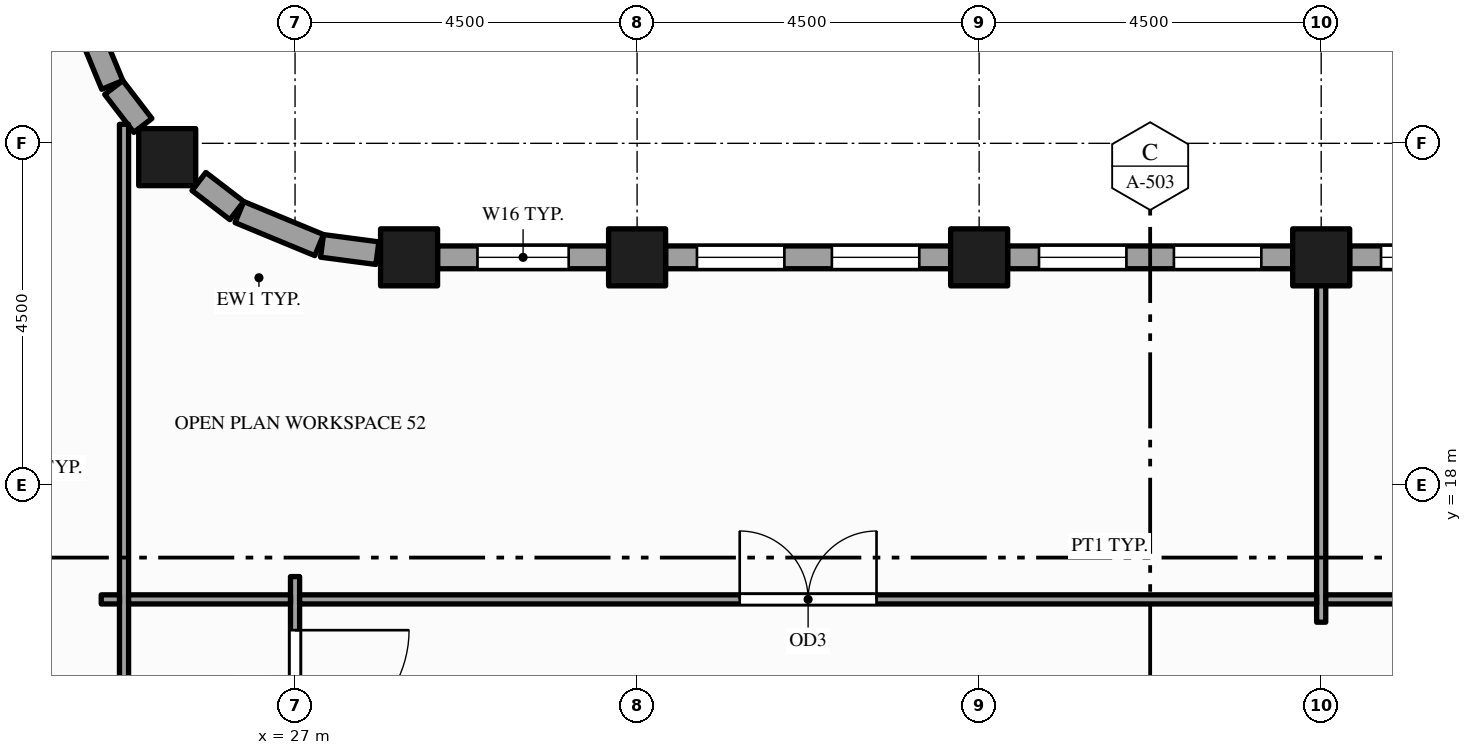
"""IFC4 building model, lengths in metres.
Left out: names, types, materials, properties, quantities, classifications, styles, units other than length and angle.
Written with IfcOpenShell. Run it as: python <this file> out.ifc"""

import sys

from ifc_helpers import new_model, si_unit, direction, frame, frame_2d, origin, origin_2d, place, context, subcontext, project, spatial, rectangle, hollow_rectangle, extrude, element, fill, save


model = new_model("IFC4")
c1 = context("Model", 3, precision=1e-05, world=origin(), true_north=direction((0.0, 1.0)))
c2 = subcontext(c1, "Body", "Model", "MODEL_VIEW")
j1 = project(units=[si_unit("LENGTHUNIT", "METRE"), si_unit("PLANEANGLEUNIT", "RADIAN")], contexts=[c1])
p1 = place(None, origin())
s1 = spatial("IfcSite", under=j1, at=p1, CompositionType="ELEMENT")
p2 = place(p1, origin())
s2 = spatial("IfcBuilding", under=s1, at=p2, CompositionType="ELEMENT")
p3 = place(p2, frame((0.0, 0.0, 215.0)))
s3 = spatial("IfcBuildingStorey", under=s2, at=p3, CompositionType="ELEMENT", Elevation=215.0)
for number, where, z_axis, x_axis in (
    (1, (25.318, 22.318, -0.15), (0.0, 0.0, 1.0), (1.0, 0.0, 0.0)),
    (2, (28.5, 21.0, -0.15), (0.0, 0.0, 1.0), (1.0, 0.0, 0.0)),
    (3, (31.5, 21.0, -0.15), (0.0, 0.0, 1.0), (1.0, 0.0, 0.0)),
    (4, (36.0, 21.0, -0.15), (0.0, 0.0, 1.0), (1.0, 0.0, 0.0)),
    (5, (40.5, 21.0, -0.15), (0.0, 0.0, 1.0), (1.0, 0.0, 0.0)),
):
    element("IfcColumn", number, at=place(p3, frame(where, z_axis=z_axis, x_axis=x_axis)), inside=s3, PredefinedType="COLUMN", context=c2, shape_type="SweptSolid", body=[
        extrude(hollow_rectangle(XDim=0.75, YDim=0.75, WallThickness=0.036, at=origin_2d()), origin(), (0.0, 0.0, 1.0), 4.0),
    ])
p4 = place(p3, frame((44.625, 21.0, 0.0), z_axis=(0.0, 0.0, 1.0), x_axis=(-1.0, 0.0, 0.0)))
e6 = element("IfcWall", 6, at=p4, inside=s3, PredefinedType="STANDARD", context=c2, shape_type="SweptSolid", body=[
    extrude(rectangle(XDim=3.75, YDim=0.3, at=frame_2d((1.875, 0.0))), origin(), (0.0, 0.0, 1.0), 2.87),
])
p5 = place(p4, frame((0.413, 0.0, 0.9)))
e7 = element("IfcOpeningElement", 7, at=p5, cuts=e6, PredefinedType="OPENING", context=c2, shape_type="SweptSolid", body=[
    extrude(rectangle(XDim=1.15, YDim=1.75, at=frame_2d((0.575, 0.875))), frame((0.0, 0.16, 0.0), z_axis=(0.0, -1.0, 0.0), x_axis=(1.0, 0.0, 0.0)), (0.0, 0.0, 1.0), 0.32),
])
p6 = place(p4, frame((2.188, 0.0, 0.9)))
e8 = element("IfcOpeningElement", 8, at=p6, cuts=e6, PredefinedType="OPENING", context=c2, shape_type="SweptSolid", body=[
    extrude(rectangle(XDim=1.15, YDim=1.75, at=frame_2d((0.575, 0.875))), frame((0.0, 0.16, 0.0), z_axis=(0.0, -1.0, 0.0), x_axis=(1.0, 0.0, 0.0)), (0.0, 0.0, 1.0), 0.32),
])
p7 = place(p3, frame((40.125, 21.0, 0.0), z_axis=(0.0, 0.0, 1.0), x_axis=(-1.0, 0.0, 0.0)))
e9 = element("IfcWall", 9, at=p7, inside=s3, PredefinedType="STANDARD", context=c2, shape_type="SweptSolid", body=[
    extrude(rectangle(XDim=3.75, YDim=0.3, at=frame_2d((1.875, 0.0))), origin(), (0.0, 0.0, 1.0), 2.87),
])
p8 = place(p7, frame((0.413, 0.0, 0.9)))
e10 = element("IfcOpeningElement", 10, at=p8, cuts=e9, PredefinedType="OPENING", context=c2, shape_type="SweptSolid", body=[
    extrude(rectangle(XDim=1.15, YDim=1.75, at=frame_2d((0.575, 0.875))), frame((0.0, 0.16, 0.0), z_axis=(0.0, -1.0, 0.0), x_axis=(1.0, 0.0, 0.0)), (0.0, 0.0, 1.0), 0.32),
])
p9 = place(p7, frame((2.188, 0.0, 0.9)))
e11 = element("IfcOpeningElement", 11, at=p9, cuts=e9, PredefinedType="OPENING", context=c2, shape_type="SweptSolid", body=[
    extrude(rectangle(XDim=1.15, YDim=1.75, at=frame_2d((0.575, 0.875))), frame((0.0, 0.16, 0.0), z_axis=(0.0, -1.0, 0.0), x_axis=(1.0, 0.0, 0.0)), (0.0, 0.0, 1.0), 0.32),
])
p10 = place(p3, frame((35.625, 21.0, 0.0), z_axis=(0.0, 0.0, 1.0), x_axis=(-1.0, 0.0, 0.0)))
e12 = element("IfcWall", 12, at=p10, inside=s3, PredefinedType="STANDARD", context=c2, shape_type="SweptSolid", body=[
    extrude(rectangle(XDim=3.75, YDim=0.3, at=frame_2d((1.875, 0.0))), origin(), (0.0, 0.0, 1.0), 2.87),
])
p11 = place(p10, frame((0.413, 0.0, 0.9)))
e13 = element("IfcOpeningElement", 13, at=p11, cuts=e12, PredefinedType="OPENING", context=c2, shape_type="SweptSolid", body=[
    extrude(rectangle(XDim=1.15, YDim=1.75, at=frame_2d((0.575, 0.875))), frame((0.0, 0.16, 0.0), z_axis=(0.0, -1.0, 0.0), x_axis=(1.0, 0.0, 0.0)), (0.0, 0.0, 1.0), 0.32),
])
p12 = place(p10, frame((2.188, 0.0, 0.9)))
e14 = element("IfcOpeningElement", 14, at=p12, cuts=e12, PredefinedType="OPENING", context=c2, shape_type="SweptSolid", body=[
    extrude(rectangle(XDim=1.15, YDim=1.75, at=frame_2d((0.575, 0.875))), frame((0.0, 0.16, 0.0), z_axis=(0.0, -1.0, 0.0), x_axis=(1.0, 0.0, 0.0)), (0.0, 0.0, 1.0), 0.32),
])
p13 = place(p3, frame((31.125, 21.0, 0.0), z_axis=(0.0, 0.0, 1.0), x_axis=(-1.0, 0.0, 0.0)))
e15 = element("IfcWall", 15, at=p13, inside=s3, PredefinedType="STANDARD", context=c2, shape_type="SweptSolid", body=[
    extrude(rectangle(XDim=2.25, YDim=0.3, at=frame_2d((1.125, 0.0))), origin(), (0.0, 0.0, 1.0), 2.87),
])
p14 = place(p13, frame((0.525, 0.0, 0.9)))
e16 = element("IfcOpeningElement", 16, at=p14, cuts=e15, PredefinedType="OPENING", context=c2, shape_type="SweptSolid", body=[
    extrude(rectangle(XDim=1.2, YDim=1.75, at=frame_2d((0.6, 0.875))), frame((0.0, 0.16, 0.0), z_axis=(0.0, -1.0, 0.0), x_axis=(1.0, 0.0, 0.0)), (0.0, 0.0, 1.0), 0.32),
])
p15 = place(p3, frame((28.083, 21.055, 0.0), z_axis=(0.0, 0.0, 1.0), x_axis=(-0.99142711513, 0.130660917588, 0.0)))
e17 = element("IfcWall", 17, at=p15, inside=s3, PredefinedType="STANDARD", context=c2, shape_type="SweptSolid", body=[
    extrude(rectangle(XDim=0.734, YDim=0.3, at=frame_2d((0.367, 0.0))), origin(), (0.0, 0.0, 1.0), 3.157),
])
p16 = place(p3, frame((27.317, 21.161, 0.0), z_axis=(0.0, 0.0, 1.0), x_axis=(-0.923914616768, 0.382598720491, 0.0)))
e18 = element("IfcWall", 18, at=p16, inside=s3, PredefinedType="STANDARD", context=c2, shape_type="SweptSolid", body=[
    extrude(rectangle(XDim=1.135, YDim=0.3, at=frame_2d((0.568, 0.0))), origin(), (0.0, 0.0, 1.0), 2.87),
])
p17 = place(p3, frame((26.234, 21.615, 0.0), z_axis=(0.0, 0.0, 1.0), x_axis=(-0.793575131083, 0.608472276547, 0.0)))
e19 = element("IfcWall", 19, at=p17, inside=s3, PredefinedType="STANDARD", context=c2, shape_type="SweptSolid", body=[
    extrude(rectangle(XDim=0.629, YDim=0.3, at=frame_2d((0.314, 0.0))), origin(), (0.0, 0.0, 1.0), 3.157),
])
p18 = place(p3, frame((24.998, 22.735, 0.0), z_axis=(0.0, 0.0, 1.0), x_axis=(-0.608472276547, 0.793575131083, 0.0)))
e20 = element("IfcWall", 20, at=p18, inside=s3, PredefinedType="STANDARD", context=c2, shape_type="SweptSolid", body=[
    extrude(rectangle(XDim=0.629, YDim=0.3, at=frame_2d((0.314, 0.0))), origin(), (0.0, 0.0, 1.0), 2.76),
])
p19 = place(p3, frame((24.595, 23.268, 0.0), z_axis=(0.0, 0.0, 1.0), x_axis=(-0.382598720491, 0.923914616768, 0.0)))
e21 = element("IfcWall", 21, at=p19, inside=s3, PredefinedType="STANDARD", context=c2, shape_type="SweptSolid", body=[
    extrude(rectangle(XDim=1.135, YDim=0.3, at=frame_2d((0.568, 0.0))), origin(), (0.0, 0.0, 1.0), 2.76),
])
p20 = place(p3, frame((24.75, -1.35, 0.0), z_axis=(0.0, 0.0, 1.0), x_axis=(0.0, 1.0, 0.0)))
e22 = element("IfcWall", 22, at=p20, inside=s3, PredefinedType="PARTITIONING", context=c2, shape_type="SweptSolid", body=[
    extrude(rectangle(XDim=24.101, YDim=0.12, at=frame_2d((12.05, 0.0))), origin(), (0.0, 0.0, 1.0), 2.76),
])
p21 = place(p20, frame((8.475, 0.0, 0.0)))
e23 = element("IfcOpeningElement", 23, at=p21, cuts=e22, PredefinedType="OPENING", context=c2, shape_type="SweptSolid", body=[
    extrude(rectangle(XDim=1.5, YDim=2.1, at=frame_2d((0.75, 1.05))), frame((0.0, 0.07, 0.0), z_axis=(0.0, -1.0, 0.0), x_axis=(1.0, 0.0, 0.0)), (0.0, 0.0, 1.0), 0.14),
])
p22 = place(p20, frame((13.5, 0.0, 0.0)))
e24 = element("IfcOpeningElement", 24, at=p22, cuts=e22, PredefinedType="OPENING", context=c2, shape_type="SweptSolid", body=[
    extrude(rectangle(XDim=1.2, YDim=2.1, at=frame_2d((0.6, 1.05))), frame((0.0, 0.07, 0.0), z_axis=(0.0, -1.0, 0.0), x_axis=(1.0, 0.0, 0.0)), (0.0, 0.0, 1.0), 0.14),
])
p23 = place(p3, frame((27.0, 2.7, 0.0), z_axis=(0.0, 0.0, 1.0), x_axis=(0.0, 1.0, 0.0)))
e25 = element("IfcWall", 25, at=p23, inside=s3, PredefinedType="PARTITIONING", context=c2, shape_type="SweptSolid", body=[
    extrude(rectangle(XDim=14.1, YDim=0.12, at=frame_2d((7.05, 0.0))), origin(), (0.0, 0.0, 1.0), 2.87),
])
p24 = place(p23, frame((0.705, 0.0, 0.0)))
e26 = element("IfcOpeningElement", 26, at=p24, cuts=e25, PredefinedType="OPENING", context=c2, shape_type="SweptSolid", body=[
    extrude(rectangle(XDim=1.5, YDim=2.1, at=frame_2d((0.75, 1.05))), frame((0.0, 0.07, 0.0), z_axis=(0.0, -1.0, 0.0), x_axis=(1.0, 0.0, 0.0)), (0.0, 0.0, 1.0), 0.14),
])
p25 = place(p23, frame((11.895, 0.0, 0.0)))
e27 = element("IfcOpeningElement", 27, at=p25, cuts=e25, PredefinedType="OPENING", context=c2, shape_type="SweptSolid", body=[
    extrude(rectangle(XDim=1.5, YDim=2.1, at=frame_2d((0.75, 1.05))), frame((0.0, 0.07, 0.0), z_axis=(0.0, -1.0, 0.0), x_axis=(1.0, 0.0, 0.0)), (0.0, 0.0, 1.0), 0.14),
])
p26 = place(p3, frame((40.5, 16.2, 0.0), z_axis=(0.0, 0.0, 1.0), x_axis=(0.0, 1.0, 0.0)))
e28 = element("IfcWall", 28, at=p26, inside=s3, PredefinedType="PARTITIONING", context=c2, shape_type="SweptSolid", body=[
    extrude(rectangle(XDim=4.65, YDim=0.12, at=frame_2d((2.325, 0.0))), origin(), (0.0, 0.0, 1.0), 2.87),
])
p27 = place(p3, frame((24.45, 16.5, 0.0), z_axis=(0.0, 0.0, 1.0), x_axis=(1.0, 0.0, 0.0)))
e29 = element("IfcWall", 29, at=p27, inside=s3, PredefinedType="PARTITIONING", context=c2, shape_type="SweptSolid", body=[
    extrude(rectangle(XDim=0.24, YDim=0.12, at=frame_2d((0.12, 0.0))), origin(), (0.0, 0.0, 1.0), 2.76),
])
p28 = place(p3, frame((24.81, 16.5, 0.0), z_axis=(0.0, 0.0, 1.0), x_axis=(1.0, 0.0, 0.0)))
e30 = element("IfcWall", 30, at=p28, inside=s3, PredefinedType="PARTITIONING", context=c2, shape_type="SweptSolid", body=[
    extrude(rectangle(XDim=2.13, YDim=0.12, at=frame_2d((1.065, 0.0))), origin(), (0.0, 0.0, 1.0), 2.76),
])
p29 = place(p3, frame((27.06, 16.5, 0.0), z_axis=(0.0, 0.0, 1.0), x_axis=(1.0, 0.0, 0.0)))
e31 = element("IfcWall", 31, at=p29, inside=s3, PredefinedType="PARTITIONING", context=c2, shape_type="SweptSolid", body=[
    extrude(rectangle(XDim=13.38, YDim=0.12, at=frame_2d((6.69, 0.0))), origin(), (0.0, 0.0, 1.0), 2.87),
])
p30 = place(p29, frame((5.79, 0.0, 0.0)))
e32 = element("IfcOpeningElement", 32, at=p30, cuts=e31, PredefinedType="OPENING", context=c2, shape_type="SweptSolid", body=[
    extrude(rectangle(XDim=1.8, YDim=2.1, at=frame_2d((0.9, 1.05))), frame((0.0, 0.07, 0.0), z_axis=(0.0, -1.0, 0.0), x_axis=(1.0, 0.0, 0.0)), (0.0, 0.0, 1.0), 0.14),
])
p31 = place(p3, frame((40.56, 16.5, 0.0), z_axis=(0.0, 0.0, 1.0), x_axis=(1.0, 0.0, 0.0)))
e33 = element("IfcWall", 33, at=p31, inside=s3, PredefinedType="PARTITIONING", context=c2, shape_type="SweptSolid", body=[
    extrude(rectangle(XDim=4.38, YDim=0.12, at=frame_2d((2.19, 0.0))), origin(), (0.0, 0.0, 1.0), 2.87),
])
p32 = place(p31, frame((1.69, 0.0, 0.0)))
e34 = element("IfcOpeningElement", 34, at=p32, cuts=e33, PredefinedType="OPENING", context=c2, shape_type="SweptSolid", body=[
    extrude(rectangle(XDim=1.0, YDim=2.1, at=frame_2d((0.5, 1.05))), frame((0.0, 0.07, 0.0), z_axis=(0.0, -1.0, 0.0), x_axis=(1.0, 0.0, 0.0)), (0.0, 0.0, 1.0), 0.14),
])
p33 = place(p6, origin())
e35 = element("IfcWindow", 35, at=p33, inside=s3, PartitioningType="SINGLE_PANEL", PredefinedType="WINDOW", context=c2, shape_type="SweptSolid", body=[
    extrude(rectangle(XDim=1.15, YDim=1.75, at=frame_2d((0.575, 0.875))), frame((0.0, 0.03, 0.0), z_axis=(0.0, -1.0, 0.0), x_axis=(1.0, 0.0, 0.0)), (0.0, 0.0, 1.0), 0.06),
])
fill(e8, e35)
p34 = place(p8, origin())
e36 = element("IfcWindow", 36, at=p34, inside=s3, PartitioningType="SINGLE_PANEL", PredefinedType="WINDOW", context=c2, shape_type="SweptSolid", body=[
    extrude(rectangle(XDim=1.15, YDim=1.75, at=frame_2d((0.575, 0.875))), frame((0.0, 0.03, 0.0), z_axis=(0.0, -1.0, 0.0), x_axis=(1.0, 0.0, 0.0)), (0.0, 0.0, 1.0), 0.06),
])
fill(e10, e36)
p35 = place(p9, origin())
e37 = element("IfcWindow", 37, at=p35, inside=s3, PartitioningType="SINGLE_PANEL", PredefinedType="WINDOW", context=c2, shape_type="SweptSolid", body=[
    extrude(rectangle(XDim=1.15, YDim=1.75, at=frame_2d((0.575, 0.875))), frame((0.0, 0.03, 0.0), z_axis=(0.0, -1.0, 0.0), x_axis=(1.0, 0.0, 0.0)), (0.0, 0.0, 1.0), 0.06),
])
fill(e11, e37)
p36 = place(p11, origin())
e38 = element("IfcWindow", 38, at=p36, inside=s3, PartitioningType="SINGLE_PANEL", PredefinedType="WINDOW", context=c2, shape_type="SweptSolid", body=[
    extrude(rectangle(XDim=1.15, YDim=1.75, at=frame_2d((0.575, 0.875))), frame((0.0, 0.03, 0.0), z_axis=(0.0, -1.0, 0.0), x_axis=(1.0, 0.0, 0.0)), (0.0, 0.0, 1.0), 0.06),
])
fill(e13, e38)
p37 = place(p12, origin())
e39 = element("IfcWindow", 39, at=p37, inside=s3, PartitioningType="SINGLE_PANEL", PredefinedType="WINDOW", context=c2, shape_type="SweptSolid", body=[
    extrude(rectangle(XDim=1.15, YDim=1.75, at=frame_2d((0.575, 0.875))), frame((0.0, 0.03, 0.0), z_axis=(0.0, -1.0, 0.0), x_axis=(1.0, 0.0, 0.0)), (0.0, 0.0, 1.0), 0.06),
])
fill(e14, e39)
p38 = place(p14, origin())
e40 = element("IfcWindow", 40, at=p38, inside=s3, PartitioningType="SINGLE_PANEL", PredefinedType="WINDOW", context=c2, shape_type="SweptSolid", body=[
    extrude(rectangle(XDim=1.2, YDim=1.75, at=frame_2d((0.6, 0.875))), frame((0.0, 0.03, 0.0), z_axis=(0.0, -1.0, 0.0), x_axis=(1.0, 0.0, 0.0)), (0.0, 0.0, 1.0), 0.06),
])
fill(e16, e40)
p39 = place(p25, origin())
e41 = element("IfcDoor", 41, at=p39, inside=s3, OperationType="SINGLE_SWING_RIGHT", PredefinedType="DOOR", context=c2, shape_type="SweptSolid", body=[
    extrude(rectangle(XDim=1.5, YDim=2.1, at=frame_2d((0.75, 1.05))), frame((0.0, 0.025, 0.0), z_axis=(0.0, -1.0, 0.0), x_axis=(1.0, 0.0, 0.0)), (0.0, 0.0, 1.0), 0.05),
])
fill(e27, e41)
p40 = place(p30, origin())
e42 = element("IfcDoor", 42, at=p40, inside=s3, OperationType="DOUBLE_DOOR_SINGLE_SWING", PredefinedType="DOOR", context=c2, shape_type="SweptSolid", body=[
    extrude(rectangle(XDim=1.8, YDim=2.1, at=frame_2d((0.9, 1.05))), frame((0.0, 0.025, 0.0), z_axis=(0.0, -1.0, 0.0), x_axis=(1.0, 0.0, 0.0)), (0.0, 0.0, 1.0), 0.05),
])
fill(e32, e42)
save(model, sys.argv[1])
